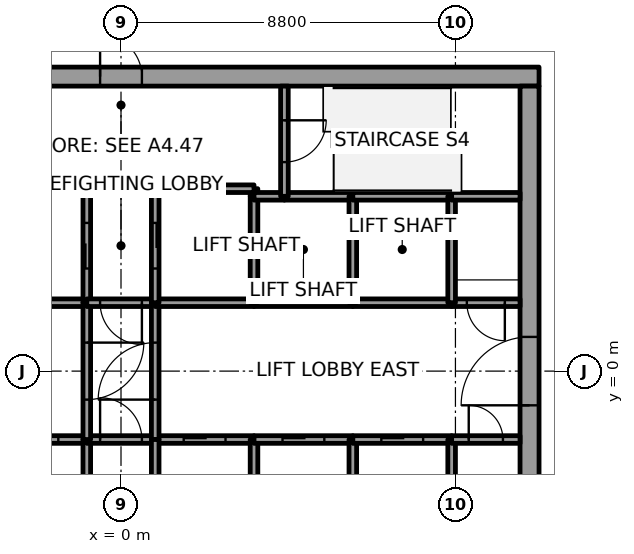
"""IFC4 building model, lengths in metres.
Left out: names, types, materials, properties, quantities, classifications, styles, units other than length and angle.
Written with IfcOpenShell. Run it as: python <this file> out.ifc"""

import sys

from ifc_helpers import new_model, si_unit, direction, frame, frame_2d, origin, place, context, subcontext, project, spatial, rectangle, extrude, element, fill, save


model = new_model("IFC4")
c1 = context("Model", 3, precision=1e-05, world=origin(), true_north=direction((0.0, 1.0)))
c2 = subcontext(c1, "Body", "Model", "MODEL_VIEW")
j1 = project(units=[si_unit("LENGTHUNIT", "METRE"), si_unit("PLANEANGLEUNIT", "RADIAN")], contexts=[c1])
p1 = place(None, origin())
s1 = spatial("IfcSite", under=j1, at=p1, CompositionType="ELEMENT")
p2 = place(p1, origin())
s2 = spatial("IfcBuilding", under=s1, at=p2, CompositionType="ELEMENT")
p3 = place(p2, frame((0.0, 0.0, 201.8)))
s3 = spatial("IfcBuildingStorey", under=s2, at=p3, CompositionType="ELEMENT", Elevation=201.8)
p4 = place(p3, frame((-11.0, 7.75, 0.0), z_axis=(0.0, 0.0, 1.0), x_axis=(1.0, 0.0, 0.0)))
e1 = element("IfcWall", 1, at=p4, inside=s3, PredefinedType="SHEAR", context=c2, shape_type="SweptSolid", body=[
    extrude(rectangle(XDim=22.0, YDim=0.5, at=frame_2d((11.0, 0.0))), origin(), (0.0, 0.0, 1.0), 4.0),
])
p5 = place(p4, frame((10.45, 0.0, 0.0)))
e2 = element("IfcOpeningElement", 2, at=p5, cuts=e1, PredefinedType="OPENING", context=c2, shape_type="SweptSolid", body=[
    extrude(rectangle(XDim=1.1, YDim=2.1, at=frame_2d((0.55, 1.05))), frame((0.0, 0.25, 0.0), z_axis=(0.0, -1.0, 0.0), x_axis=(1.0, 0.0, 0.0)), (0.0, 0.0, 1.0), 0.5),
])
p6 = place(p3, frame((10.75, -7.5, 0.0), z_axis=(0.0, 0.0, 1.0), x_axis=(0.0, 1.0, 0.0)))
e3 = element("IfcWall", 3, at=p6, inside=s3, PredefinedType="SHEAR", context=c2, shape_type="SweptSolid", body=[
    extrude(rectangle(XDim=15.0, YDim=0.5, at=frame_2d((7.5, 0.0))), origin(), (0.0, 0.0, 1.0), 4.0),
])
p7 = place(p6, frame((6.6, 0.0, 0.0)))
e4 = element("IfcOpeningElement", 4, at=p7, cuts=e3, PredefinedType="OPENING", context=c2, shape_type="SweptSolid", body=[
    extrude(rectangle(XDim=1.8, YDim=2.1, at=frame_2d((0.9, 1.05))), frame((0.0, 0.25, 0.0), z_axis=(0.0, -1.0, 0.0), x_axis=(1.0, 0.0, 0.0)), (0.0, 0.0, 1.0), 0.5),
])
p8 = place(p3, frame((-3.5, -1.8, 0.0), z_axis=(0.0, 0.0, 1.0), x_axis=(1.0, 0.0, 0.0)))
e5 = element("IfcWall", 5, at=p8, inside=s3, PredefinedType="SOLIDWALL", context=c2, shape_type="SweptSolid", body=[
    extrude(rectangle(XDim=2.6, YDim=0.2, at=frame_2d((1.3, 0.0))), origin(), (0.0, 0.0, 1.0), 3.85),
])
p9 = place(p8, frame((0.75, 0.0, 0.0)))
e6 = element("IfcOpeningElement", 6, at=p9, cuts=e5, PredefinedType="OPENING", context=c2, shape_type="SweptSolid", body=[
    extrude(rectangle(XDim=1.1, YDim=2.1, at=frame_2d((0.55, 1.05))), frame((0.0, 0.1, 0.0), z_axis=(0.0, -1.0, 0.0), x_axis=(1.0, 0.0, 0.0)), (0.0, 0.0, 1.0), 0.2),
])
p10 = place(p3, frame((-0.9, 1.8, 0.0), z_axis=(0.0, 0.0, 1.0), x_axis=(-1.0, 0.0, 0.0)))
e7 = element("IfcWall", 7, at=p10, inside=s3, PredefinedType="SOLIDWALL", context=c2, shape_type="SweptSolid", body=[
    extrude(rectangle(XDim=2.6, YDim=0.2, at=frame_2d((1.3, 0.0))), origin(), (0.0, 0.0, 1.0), 3.85),
])
p11 = place(p3, frame((-0.9, 1.8, 0.0), z_axis=(0.0, 0.0, 1.0), x_axis=(0.0, 1.0, 0.0)))
e8 = element("IfcWall", 8, at=p11, inside=s3, PredefinedType="SOLIDWALL", context=c2, shape_type="SweptSolid", body=[
    extrude(rectangle(XDim=3.0, YDim=0.2, at=frame_2d((1.5, 0.0))), origin(), (0.0, 0.0, 1.0), 3.85),
])
p12 = place(p11, frame((0.9, 0.0, 0.0)))
e9 = element("IfcOpeningElement", 9, at=p12, cuts=e8, PredefinedType="OPENING", context=c2, shape_type="SweptSolid", body=[
    extrude(rectangle(XDim=1.2, YDim=2.1, at=frame_2d((0.6, 1.05))), frame((0.0, 0.1, 0.0), z_axis=(0.0, -1.0, 0.0), x_axis=(1.0, 0.0, 0.0)), (0.0, 0.0, 1.0), 0.2),
])
p13 = place(p3, frame((-0.9, 4.8, 0.0), z_axis=(0.0, 0.0, 1.0), x_axis=(-1.0, 0.0, 0.0)))
e10 = element("IfcWall", 10, at=p13, inside=s3, PredefinedType="SOLIDWALL", context=c2, shape_type="SweptSolid", body=[
    extrude(rectangle(XDim=2.6, YDim=0.2, at=frame_2d((1.3, 0.0))), origin(), (0.0, 0.0, 1.0), 3.85),
])
p14 = place(p3, frame((-0.9, -4.6, 0.0), z_axis=(0.0, 0.0, 1.0), x_axis=(0.0, 1.0, 0.0)))
e11 = element("IfcWall", 11, at=p14, inside=s3, PredefinedType="SOLIDWALL", context=c2, shape_type="SweptSolid", body=[
    extrude(rectangle(XDim=2.8, YDim=0.2, at=frame_2d((1.4, 0.0))), origin(), (0.0, 0.0, 1.0), 3.85),
])
p15 = place(p3, frame((-0.9, -1.8, 0.0), z_axis=(0.0, 0.0, 1.0), x_axis=(1.0, 0.0, 0.0)))
e12 = element("IfcWall", 12, at=p15, inside=s3, PredefinedType="SOLIDWALL", context=c2, shape_type="SweptSolid", body=[
    extrude(rectangle(XDim=1.8, YDim=0.2, at=frame_2d((0.9, 0.0))), origin(), (0.0, 0.0, 1.0), 3.85),
])
p16 = place(p15, frame((0.35, 0.0, 0.0)))
e13 = element("IfcOpeningElement", 13, at=p16, cuts=e12, PredefinedType="OPENING", context=c2, shape_type="SweptSolid", body=[
    extrude(rectangle(XDim=1.1, YDim=2.1, at=frame_2d((0.55, 1.05))), frame((0.0, 0.1, 0.0), z_axis=(0.0, -1.0, 0.0), x_axis=(1.0, 0.0, 0.0)), (0.0, 0.0, 1.0), 0.2),
])
p17 = place(p3, frame((-0.9, 1.8, 0.0), z_axis=(0.0, 0.0, 1.0), x_axis=(0.0, -1.0, 0.0)))
e14 = element("IfcWall", 14, at=p17, inside=s3, PredefinedType="SOLIDWALL", context=c2, shape_type="SweptSolid", body=[
    extrude(rectangle(XDim=3.6, YDim=0.2, at=frame_2d((1.8, 0.0))), origin(), (0.0, 0.0, 1.0), 3.85),
])
p18 = place(p17, frame((1.05, 0.0, 0.0)))
e15 = element("IfcOpeningElement", 15, at=p18, cuts=e14, PredefinedType="OPENING", context=c2, shape_type="SweptSolid", body=[
    extrude(rectangle(XDim=1.5, YDim=2.1, at=frame_2d((0.75, 1.05))), frame((0.0, 0.1, 0.0), z_axis=(0.0, -1.0, 0.0), x_axis=(1.0, 0.0, 0.0)), (0.0, 0.0, 1.0), 0.2),
])
p19 = place(p3, frame((0.9, 1.8, 0.0), z_axis=(0.0, 0.0, 1.0), x_axis=(-1.0, 0.0, 0.0)))
e16 = element("IfcWall", 16, at=p19, inside=s3, PredefinedType="SOLIDWALL", context=c2, shape_type="SweptSolid", body=[
    extrude(rectangle(XDim=1.8, YDim=0.2, at=frame_2d((0.9, 0.0))), origin(), (0.0, 0.0, 1.0), 3.85),
])
p20 = place(p19, frame((0.35, 0.0, 0.0)))
e17 = element("IfcOpeningElement", 17, at=p20, cuts=e16, PredefinedType="OPENING", context=c2, shape_type="SweptSolid", body=[
    extrude(rectangle(XDim=1.1, YDim=2.1, at=frame_2d((0.55, 1.05))), frame((0.0, 0.1, 0.0), z_axis=(0.0, -1.0, 0.0), x_axis=(1.0, 0.0, 0.0)), (0.0, 0.0, 1.0), 0.2),
])
p21 = place(p3, frame((0.9, -1.8, 0.0), z_axis=(0.0, 0.0, 1.0), x_axis=(1.0, 0.0, 0.0)))
e18 = element("IfcWall", 18, at=p21, inside=s3, PredefinedType="SOLIDWALL", context=c2, shape_type="SweptSolid", body=[
    extrude(rectangle(XDim=2.6, YDim=0.2, at=frame_2d((1.3, 0.0))), origin(), (0.0, 0.0, 1.0), 3.85),
])
p22 = place(p21, frame((0.75, 0.0, 0.0)))
e19 = element("IfcOpeningElement", 19, at=p22, cuts=e18, PredefinedType="OPENING", context=c2, shape_type="SweptSolid", body=[
    extrude(rectangle(XDim=1.1, YDim=2.1, at=frame_2d((0.55, 1.05))), frame((0.0, 0.1, 0.0), z_axis=(0.0, -1.0, 0.0), x_axis=(1.0, 0.0, 0.0)), (0.0, 0.0, 1.0), 0.2),
])
p23 = place(p3, frame((0.9, -1.8, 0.0), z_axis=(0.0, 0.0, 1.0), x_axis=(0.0, 1.0, 0.0)))
e20 = element("IfcWall", 20, at=p23, inside=s3, PredefinedType="SOLIDWALL", context=c2, shape_type="SweptSolid", body=[
    extrude(rectangle(XDim=3.6, YDim=0.2, at=frame_2d((1.8, 0.0))), origin(), (0.0, 0.0, 1.0), 3.85),
])
p24 = place(p23, frame((1.05, 0.0, 0.0)))
e21 = element("IfcOpeningElement", 21, at=p24, cuts=e20, PredefinedType="OPENING", context=c2, shape_type="SweptSolid", body=[
    extrude(rectangle(XDim=1.5, YDim=2.1, at=frame_2d((0.75, 1.05))), frame((0.0, 0.1, 0.0), z_axis=(0.0, -1.0, 0.0), x_axis=(1.0, 0.0, 0.0)), (0.0, 0.0, 1.0), 0.2),
])
p25 = place(p3, frame((0.9, -1.8, 0.0), z_axis=(0.0, 0.0, 1.0), x_axis=(0.0, -1.0, 0.0)))
e22 = element("IfcWall", 22, at=p25, inside=s3, PredefinedType="SOLIDWALL", context=c2, shape_type="SweptSolid", body=[
    extrude(rectangle(XDim=2.8, YDim=0.2, at=frame_2d((1.4, 0.0))), origin(), (0.0, 0.0, 1.0), 3.85),
])
p26 = place(p3, frame((3.5, 1.8, 0.0), z_axis=(0.0, 0.0, 1.0), x_axis=(-1.0, 0.0, 0.0)))
e23 = element("IfcWall", 23, at=p26, inside=s3, PredefinedType="SOLIDWALL", context=c2, shape_type="SweptSolid", body=[
    extrude(rectangle(XDim=2.6, YDim=0.2, at=frame_2d((1.3, 0.0))), origin(), (0.0, 0.0, 1.0), 3.85),
])
p27 = place(p3, frame((3.5, 4.6, 0.0), z_axis=(0.0, 0.0, 1.0), x_axis=(0.0, 1.0, 0.0)))
e24 = element("IfcWall", 24, at=p27, inside=s3, PredefinedType="SOLIDWALL", context=c2, shape_type="SweptSolid", body=[
    extrude(rectangle(XDim=0.2, YDim=0.2, at=frame_2d((0.1, 0.0))), origin(), (0.0, 0.0, 1.0), 3.85),
])
p28 = place(p3, frame((3.5, 4.8, 0.0), z_axis=(0.0, 0.0, 1.0), x_axis=(-1.0, 0.0, 0.0)))
e25 = element("IfcWall", 25, at=p28, inside=s3, PredefinedType="SOLIDWALL", context=c2, shape_type="SweptSolid", body=[
    extrude(rectangle(XDim=2.6, YDim=0.2, at=frame_2d((1.3, 0.0))), origin(), (0.0, 0.0, 1.0), 3.85),
])
p29 = place(p3, frame((0.9, 4.8, 0.0), z_axis=(0.0, 0.0, 1.0), x_axis=(0.0, -1.0, 0.0)))
e26 = element("IfcWall", 26, at=p29, inside=s3, PredefinedType="SOLIDWALL", context=c2, shape_type="SweptSolid", body=[
    extrude(rectangle(XDim=3.0, YDim=0.2, at=frame_2d((1.5, 0.0))), origin(), (0.0, 0.0, 1.0), 3.85),
])
p30 = place(p29, frame((0.9, 0.0, 0.0)))
e27 = element("IfcOpeningElement", 27, at=p30, cuts=e26, PredefinedType="OPENING", context=c2, shape_type="SweptSolid", body=[
    extrude(rectangle(XDim=1.2, YDim=2.1, at=frame_2d((0.6, 1.05))), frame((0.0, 0.1, 0.0), z_axis=(0.0, -1.0, 0.0), x_axis=(1.0, 0.0, 0.0)), (0.0, 0.0, 1.0), 0.2),
])
p31 = place(p3, frame((3.5, -4.6, 0.0), z_axis=(0.0, 0.0, 1.0), x_axis=(0.0, 1.0, 0.0)))
e28 = element("IfcWall", 28, at=p31, inside=s3, PredefinedType="SOLIDWALL", context=c2, shape_type="SweptSolid", body=[
    extrude(rectangle(XDim=2.8, YDim=0.2, at=frame_2d((1.4, 0.0))), origin(), (0.0, 0.0, 1.0), 3.85),
])
p32 = place(p3, frame((3.5, -1.8, 0.0), z_axis=(0.0, 0.0, 1.0), x_axis=(1.0, 0.0, 0.0)))
e29 = element("IfcWall", 29, at=p32, inside=s3, PredefinedType="SOLIDWALL", context=c2, shape_type="SweptSolid", body=[
    extrude(rectangle(XDim=2.6, YDim=0.2, at=frame_2d((1.3, 0.0))), origin(), (0.0, 0.0, 1.0), 3.85),
])
p33 = place(p32, frame((0.75, 0.0, 0.0)))
e30 = element("IfcOpeningElement", 30, at=p33, cuts=e29, PredefinedType="OPENING", context=c2, shape_type="SweptSolid", body=[
    extrude(rectangle(XDim=1.1, YDim=2.1, at=frame_2d((0.55, 1.05))), frame((0.0, 0.1, 0.0), z_axis=(0.0, -1.0, 0.0), x_axis=(1.0, 0.0, 0.0)), (0.0, 0.0, 1.0), 0.2),
])
p34 = place(p3, frame((6.1, 1.8, 0.0), z_axis=(0.0, 0.0, 1.0), x_axis=(-1.0, 0.0, 0.0)))
e31 = element("IfcWall", 31, at=p34, inside=s3, PredefinedType="SOLIDWALL", context=c2, shape_type="SweptSolid", body=[
    extrude(rectangle(XDim=2.6, YDim=0.2, at=frame_2d((1.3, 0.0))), origin(), (0.0, 0.0, 1.0), 3.85),
])
p35 = place(p3, frame((3.5, 1.8, 0.0), z_axis=(0.0, 0.0, 1.0), x_axis=(0.0, 1.0, 0.0)))
e32 = element("IfcWall", 32, at=p35, inside=s3, PredefinedType="SOLIDWALL", context=c2, shape_type="SweptSolid", body=[
    extrude(rectangle(XDim=2.8, YDim=0.2, at=frame_2d((1.4, 0.0))), origin(), (0.0, 0.0, 1.0), 3.85),
])
p36 = place(p3, frame((4.3, 4.6, 0.0), z_axis=(0.0, 0.0, 1.0), x_axis=(-1.0, 0.0, 0.0)))
e33 = element("IfcWall", 33, at=p36, inside=s3, PredefinedType="SOLIDWALL", context=c2, shape_type="SweptSolid", body=[
    extrude(rectangle(XDim=0.8, YDim=0.2, at=frame_2d((0.4, 0.0))), origin(), (0.0, 0.0, 1.0), 3.85),
])
p37 = place(p3, frame((6.1, 4.6, 0.0), z_axis=(0.0, 0.0, 1.0), x_axis=(-1.0, 0.0, 0.0)))
e34 = element("IfcWall", 34, at=p37, inside=s3, PredefinedType="SOLIDWALL", context=c2, shape_type="SweptSolid", body=[
    extrude(rectangle(XDim=1.8, YDim=0.2, at=frame_2d((0.9, 0.0))), origin(), (0.0, 0.0, 1.0), 3.85),
])
p38 = place(p3, frame((4.3, 7.5, 0.0), z_axis=(0.0, 0.0, 1.0), x_axis=(0.0, -1.0, 0.0)))
e35 = element("IfcWall", 35, at=p38, inside=s3, PredefinedType="SOLIDWALL", context=c2, shape_type="SweptSolid", body=[
    extrude(rectangle(XDim=2.9, YDim=0.2, at=frame_2d((1.45, 0.0))), origin(), (0.0, 0.0, 1.0), 3.85),
])
p39 = place(p38, frame((0.9, 0.0, 0.0)))
e36 = element("IfcOpeningElement", 36, at=p39, cuts=e35, PredefinedType="OPENING", context=c2, shape_type="SweptSolid", body=[
    extrude(rectangle(XDim=1.1, YDim=2.1, at=frame_2d((0.55, 1.05))), frame((0.0, 0.1, 0.0), z_axis=(0.0, -1.0, 0.0), x_axis=(1.0, 0.0, 0.0)), (0.0, 0.0, 1.0), 0.2),
])
p40 = place(p3, frame((6.1, -4.6, 0.0), z_axis=(0.0, 0.0, 1.0), x_axis=(0.0, 1.0, 0.0)))
e37 = element("IfcWall", 37, at=p40, inside=s3, PredefinedType="SOLIDWALL", context=c2, shape_type="SweptSolid", body=[
    extrude(rectangle(XDim=2.8, YDim=0.2, at=frame_2d((1.4, 0.0))), origin(), (0.0, 0.0, 1.0), 3.85),
])
p41 = place(p3, frame((6.1, -1.8, 0.0), z_axis=(0.0, 0.0, 1.0), x_axis=(1.0, 0.0, 0.0)))
e38 = element("IfcWall", 38, at=p41, inside=s3, PredefinedType="SOLIDWALL", context=c2, shape_type="SweptSolid", body=[
    extrude(rectangle(XDim=2.6, YDim=0.2, at=frame_2d((1.3, 0.0))), origin(), (0.0, 0.0, 1.0), 3.85),
])
p42 = place(p41, frame((0.75, 0.0, 0.0)))
e39 = element("IfcOpeningElement", 39, at=p42, cuts=e38, PredefinedType="OPENING", context=c2, shape_type="SweptSolid", body=[
    extrude(rectangle(XDim=1.1, YDim=2.1, at=frame_2d((0.55, 1.05))), frame((0.0, 0.1, 0.0), z_axis=(0.0, -1.0, 0.0), x_axis=(1.0, 0.0, 0.0)), (0.0, 0.0, 1.0), 0.2),
])
p43 = place(p3, frame((8.7, 1.8, 0.0), z_axis=(0.0, 0.0, 1.0), x_axis=(-1.0, 0.0, 0.0)))
e40 = element("IfcWall", 40, at=p43, inside=s3, PredefinedType="SOLIDWALL", context=c2, shape_type="SweptSolid", body=[
    extrude(rectangle(XDim=2.6, YDim=0.2, at=frame_2d((1.3, 0.0))), origin(), (0.0, 0.0, 1.0), 3.85),
])
p44 = place(p3, frame((6.1, 1.8, 0.0), z_axis=(0.0, 0.0, 1.0), x_axis=(0.0, 1.0, 0.0)))
e41 = element("IfcWall", 41, at=p44, inside=s3, PredefinedType="SOLIDWALL", context=c2, shape_type="SweptSolid", body=[
    extrude(rectangle(XDim=2.8, YDim=0.2, at=frame_2d((1.4, 0.0))), origin(), (0.0, 0.0, 1.0), 3.85),
])
p45 = place(p3, frame((8.7, 4.6, 0.0), z_axis=(0.0, 0.0, 1.0), x_axis=(-1.0, 0.0, 0.0)))
e42 = element("IfcWall", 42, at=p45, inside=s3, PredefinedType="SOLIDWALL", context=c2, shape_type="SweptSolid", body=[
    extrude(rectangle(XDim=2.6, YDim=0.2, at=frame_2d((1.3, 0.0))), origin(), (0.0, 0.0, 1.0), 3.85),
])
p46 = place(p3, frame((8.7, -1.8, 0.0), z_axis=(0.0, 0.0, 1.0), x_axis=(0.0, -1.0, 0.0)))
e43 = element("IfcWall", 43, at=p46, inside=s3, PredefinedType="SOLIDWALL", context=c2, shape_type="SweptSolid", body=[
    extrude(rectangle(XDim=2.8, YDim=0.2, at=frame_2d((1.4, 0.0))), origin(), (0.0, 0.0, 1.0), 3.85),
])
p47 = place(p3, frame((8.7, -1.8, 0.0), z_axis=(0.0, 0.0, 1.0), x_axis=(1.0, 0.0, 0.0)))
e44 = element("IfcWall", 44, at=p47, inside=s3, PredefinedType="SOLIDWALL", context=c2, shape_type="SweptSolid", body=[
    extrude(rectangle(XDim=1.8, YDim=0.2, at=frame_2d((0.9, 0.0))), origin(), (0.0, 0.0, 1.0), 3.85),
])
p48 = place(p47, frame((0.45, 0.0, 0.0)))
e45 = element("IfcOpeningElement", 45, at=p48, cuts=e44, PredefinedType="OPENING", context=c2, shape_type="SweptSolid", body=[
    extrude(rectangle(XDim=0.9, YDim=2.1, at=frame_2d((0.45, 1.05))), frame((0.0, 0.1, 0.0), z_axis=(0.0, -1.0, 0.0), x_axis=(1.0, 0.0, 0.0)), (0.0, 0.0, 1.0), 0.2),
])
p49 = place(p3, frame((10.5, 1.8, 0.0), z_axis=(0.0, 0.0, 1.0), x_axis=(-1.0, 0.0, 0.0)))
e46 = element("IfcWall", 46, at=p49, inside=s3, PredefinedType="SOLIDWALL", context=c2, shape_type="SweptSolid", body=[
    extrude(rectangle(XDim=1.8, YDim=0.2, at=frame_2d((0.9, 0.0))), origin(), (0.0, 0.0, 1.0), 3.85),
])
p50 = place(p49, frame((0.4, 0.0, 0.0)))
e47 = element("IfcOpeningElement", 47, at=p50, cuts=e46, PredefinedType="OPENING", context=c2, shape_type="SweptSolid", body=[
    extrude(rectangle(XDim=1.0, YDim=2.1, at=frame_2d((0.5, 1.05))), frame((0.0, 0.1, 0.0), z_axis=(0.0, -1.0, 0.0), x_axis=(1.0, 0.0, 0.0)), (0.0, 0.0, 1.0), 0.2),
])
p51 = place(p3, frame((8.7, 4.6, 0.0), z_axis=(0.0, 0.0, 1.0), x_axis=(0.0, -1.0, 0.0)))
e48 = element("IfcWall", 48, at=p51, inside=s3, PredefinedType="SOLIDWALL", context=c2, shape_type="SweptSolid", body=[
    extrude(rectangle(XDim=2.8, YDim=0.2, at=frame_2d((1.4, 0.0))), origin(), (0.0, 0.0, 1.0), 3.85),
])
p52 = place(p3, frame((10.5, 4.6, 0.0), z_axis=(0.0, 0.0, 1.0), x_axis=(-1.0, 0.0, 0.0)))
e49 = element("IfcWall", 49, at=p52, inside=s3, PredefinedType="SOLIDWALL", context=c2, shape_type="SweptSolid", body=[
    extrude(rectangle(XDim=1.8, YDim=0.2, at=frame_2d((0.9, 0.0))), origin(), (0.0, 0.0, 1.0), 3.85),
])
p53 = place(p9, origin())
e50 = element("IfcDoor", 50, at=p53, inside=s3, OperationType="SLIDING_TO_LEFT", PredefinedType="DOOR", context=c2, shape_type="SweptSolid", body=[
    extrude(rectangle(XDim=1.1, YDim=2.1, at=frame_2d((0.55, 1.05))), frame((0.0, 0.025, 0.0), z_axis=(0.0, -1.0, 0.0), x_axis=(1.0, 0.0, 0.0)), (0.0, 0.0, 1.0), 0.05),
])
fill(e6, e50)
p54 = place(p22, origin())
e51 = element("IfcDoor", 51, at=p54, inside=s3, OperationType="SLIDING_TO_RIGHT", PredefinedType="DOOR", context=c2, shape_type="SweptSolid", body=[
    extrude(rectangle(XDim=1.1, YDim=2.1, at=frame_2d((0.55, 1.05))), frame((0.0, 0.025, 0.0), z_axis=(0.0, -1.0, 0.0), x_axis=(1.0, 0.0, 0.0)), (0.0, 0.0, 1.0), 0.05),
])
fill(e19, e51)
p55 = place(p33, origin())
e52 = element("IfcDoor", 52, at=p55, inside=s3, OperationType="SLIDING_TO_LEFT", PredefinedType="DOOR", context=c2, shape_type="SweptSolid", body=[
    extrude(rectangle(XDim=1.1, YDim=2.1, at=frame_2d((0.55, 1.05))), frame((0.0, 0.025, 0.0), z_axis=(0.0, -1.0, 0.0), x_axis=(1.0, 0.0, 0.0)), (0.0, 0.0, 1.0), 0.05),
])
fill(e30, e52)
p56 = place(p42, origin())
e53 = element("IfcDoor", 53, at=p56, inside=s3, OperationType="SLIDING_TO_RIGHT", PredefinedType="DOOR", context=c2, shape_type="SweptSolid", body=[
    extrude(rectangle(XDim=1.1, YDim=2.1, at=frame_2d((0.55, 1.05))), frame((0.0, 0.025, 0.0), z_axis=(0.0, -1.0, 0.0), x_axis=(1.0, 0.0, 0.0)), (0.0, 0.0, 1.0), 0.05),
])
fill(e39, e53)
p57 = place(p12, origin())
e54 = element("IfcDoor", 54, at=p57, inside=s3, OperationType="SLIDING_TO_LEFT", PredefinedType="DOOR", context=c2, shape_type="SweptSolid", body=[
    extrude(rectangle(XDim=1.2, YDim=2.1, at=frame_2d((0.6, 1.05))), frame((0.0, 0.025, 0.0), z_axis=(0.0, -1.0, 0.0), x_axis=(1.0, 0.0, 0.0)), (0.0, 0.0, 1.0), 0.05),
])
fill(e9, e54)
p58 = place(p30, origin())
e55 = element("IfcDoor", 55, at=p58, inside=s3, OperationType="SLIDING_TO_RIGHT", PredefinedType="DOOR", context=c2, shape_type="SweptSolid", body=[
    extrude(rectangle(XDim=1.2, YDim=2.1, at=frame_2d((0.6, 1.05))), frame((0.0, 0.025, 0.0), z_axis=(0.0, -1.0, 0.0), x_axis=(1.0, 0.0, 0.0)), (0.0, 0.0, 1.0), 0.05),
])
fill(e27, e55)
p59 = place(p18, origin())
e56 = element("IfcDoor", 56, at=p59, inside=s3, OperationType="DOUBLE_DOOR_SINGLE_SWING", PredefinedType="DOOR", context=c2, shape_type="SweptSolid", body=[
    extrude(rectangle(XDim=1.5, YDim=2.1, at=frame_2d((0.75, 1.05))), frame((0.0, 0.025, 0.0), z_axis=(0.0, -1.0, 0.0), x_axis=(1.0, 0.0, 0.0)), (0.0, 0.0, 1.0), 0.05),
])
fill(e15, e56)
p60 = place(p24, origin())
e57 = element("IfcDoor", 57, at=p60, inside=s3, OperationType="DOUBLE_DOOR_SINGLE_SWING", PredefinedType="DOOR", context=c2, shape_type="SweptSolid", body=[
    extrude(rectangle(XDim=1.5, YDim=2.1, at=frame_2d((0.75, 1.05))), frame((0.0, 0.025, 0.0), z_axis=(0.0, -1.0, 0.0), x_axis=(1.0, 0.0, 0.0)), (0.0, 0.0, 1.0), 0.05),
])
fill(e21, e57)
p61 = place(p20, origin())
e58 = element("IfcDoor", 58, at=p61, inside=s3, OperationType="SINGLE_SWING_RIGHT", PredefinedType="DOOR", context=c2, shape_type="SweptSolid", body=[
    extrude(rectangle(XDim=1.1, YDim=2.1, at=frame_2d((0.55, 1.05))), frame((0.0, 0.025, 0.0), z_axis=(0.0, -1.0, 0.0), x_axis=(1.0, 0.0, 0.0)), (0.0, 0.0, 1.0), 0.05),
])
fill(e17, e58)
p62 = place(p16, origin())
e59 = element("IfcDoor", 59, at=p62, inside=s3, OperationType="SINGLE_SWING_LEFT", PredefinedType="DOOR", context=c2, shape_type="SweptSolid", body=[
    extrude(rectangle(XDim=1.1, YDim=2.1, at=frame_2d((0.55, 1.05))), frame((0.0, 0.025, 0.0), z_axis=(0.0, -1.0, 0.0), x_axis=(1.0, 0.0, 0.0)), (0.0, 0.0, 1.0), 0.05),
])
fill(e13, e59)
p63 = place(p50, origin())
e60 = element("IfcDoor", 60, at=p63, inside=s3, OperationType="SINGLE_SWING_LEFT", PredefinedType="DOOR", context=c2, shape_type="SweptSolid", body=[
    extrude(rectangle(XDim=1.0, YDim=2.1, at=frame_2d((0.5, 1.05))), frame((0.0, 0.025, 0.0), z_axis=(0.0, -1.0, 0.0), x_axis=(1.0, 0.0, 0.0)), (0.0, 0.0, 1.0), 0.05),
])
fill(e47, e60)
p64 = place(p39, origin())
e61 = element("IfcDoor", 61, at=p64, inside=s3, OperationType="SINGLE_SWING_RIGHT", PredefinedType="DOOR", context=c2, shape_type="SweptSolid", body=[
    extrude(rectangle(XDim=1.1, YDim=2.1, at=frame_2d((0.55, 1.05))), frame((0.0, 0.025, 0.0), z_axis=(0.0, -1.0, 0.0), x_axis=(1.0, 0.0, 0.0)), (0.0, 0.0, 1.0), 0.05),
])
fill(e36, e61)
p65 = place(p48, origin())
e62 = element("IfcDoor", 62, at=p65, inside=s3, OperationType="SINGLE_SWING_LEFT", PredefinedType="DOOR", context=c2, shape_type="SweptSolid", body=[
    extrude(rectangle(XDim=0.9, YDim=2.1, at=frame_2d((0.45, 1.05))), frame((0.0, 0.025, 0.0), z_axis=(0.0, -1.0, 0.0), x_axis=(1.0, 0.0, 0.0)), (0.0, 0.0, 1.0), 0.05),
])
fill(e45, e62)
p66 = place(p7, origin())
e63 = element("IfcDoor", 63, at=p66, inside=s3, OperationType="DOUBLE_DOOR_SINGLE_SWING", PredefinedType="DOOR", context=c2, shape_type="SweptSolid", body=[
    extrude(rectangle(XDim=1.8, YDim=2.1, at=frame_2d((0.9, 1.05))), frame((0.0, 0.025, 0.0), z_axis=(0.0, -1.0, 0.0), x_axis=(1.0, 0.0, 0.0)), (0.0, 0.0, 1.0), 0.05),
])
fill(e4, e63)
p67 = place(p5, origin())
e64 = element("IfcDoor", 64, at=p67, inside=s3, OperationType="SINGLE_SWING_LEFT", PredefinedType="DOOR", context=c2, shape_type="SweptSolid", body=[
    extrude(rectangle(XDim=1.1, YDim=2.1, at=frame_2d((0.55, 1.05))), frame((0.0, 0.025, 0.0), z_axis=(0.0, -1.0, 0.0), x_axis=(1.0, 0.0, 0.0)), (0.0, 0.0, 1.0), 0.05),
])
fill(e2, e64)
save(model, sys.argv[1])
